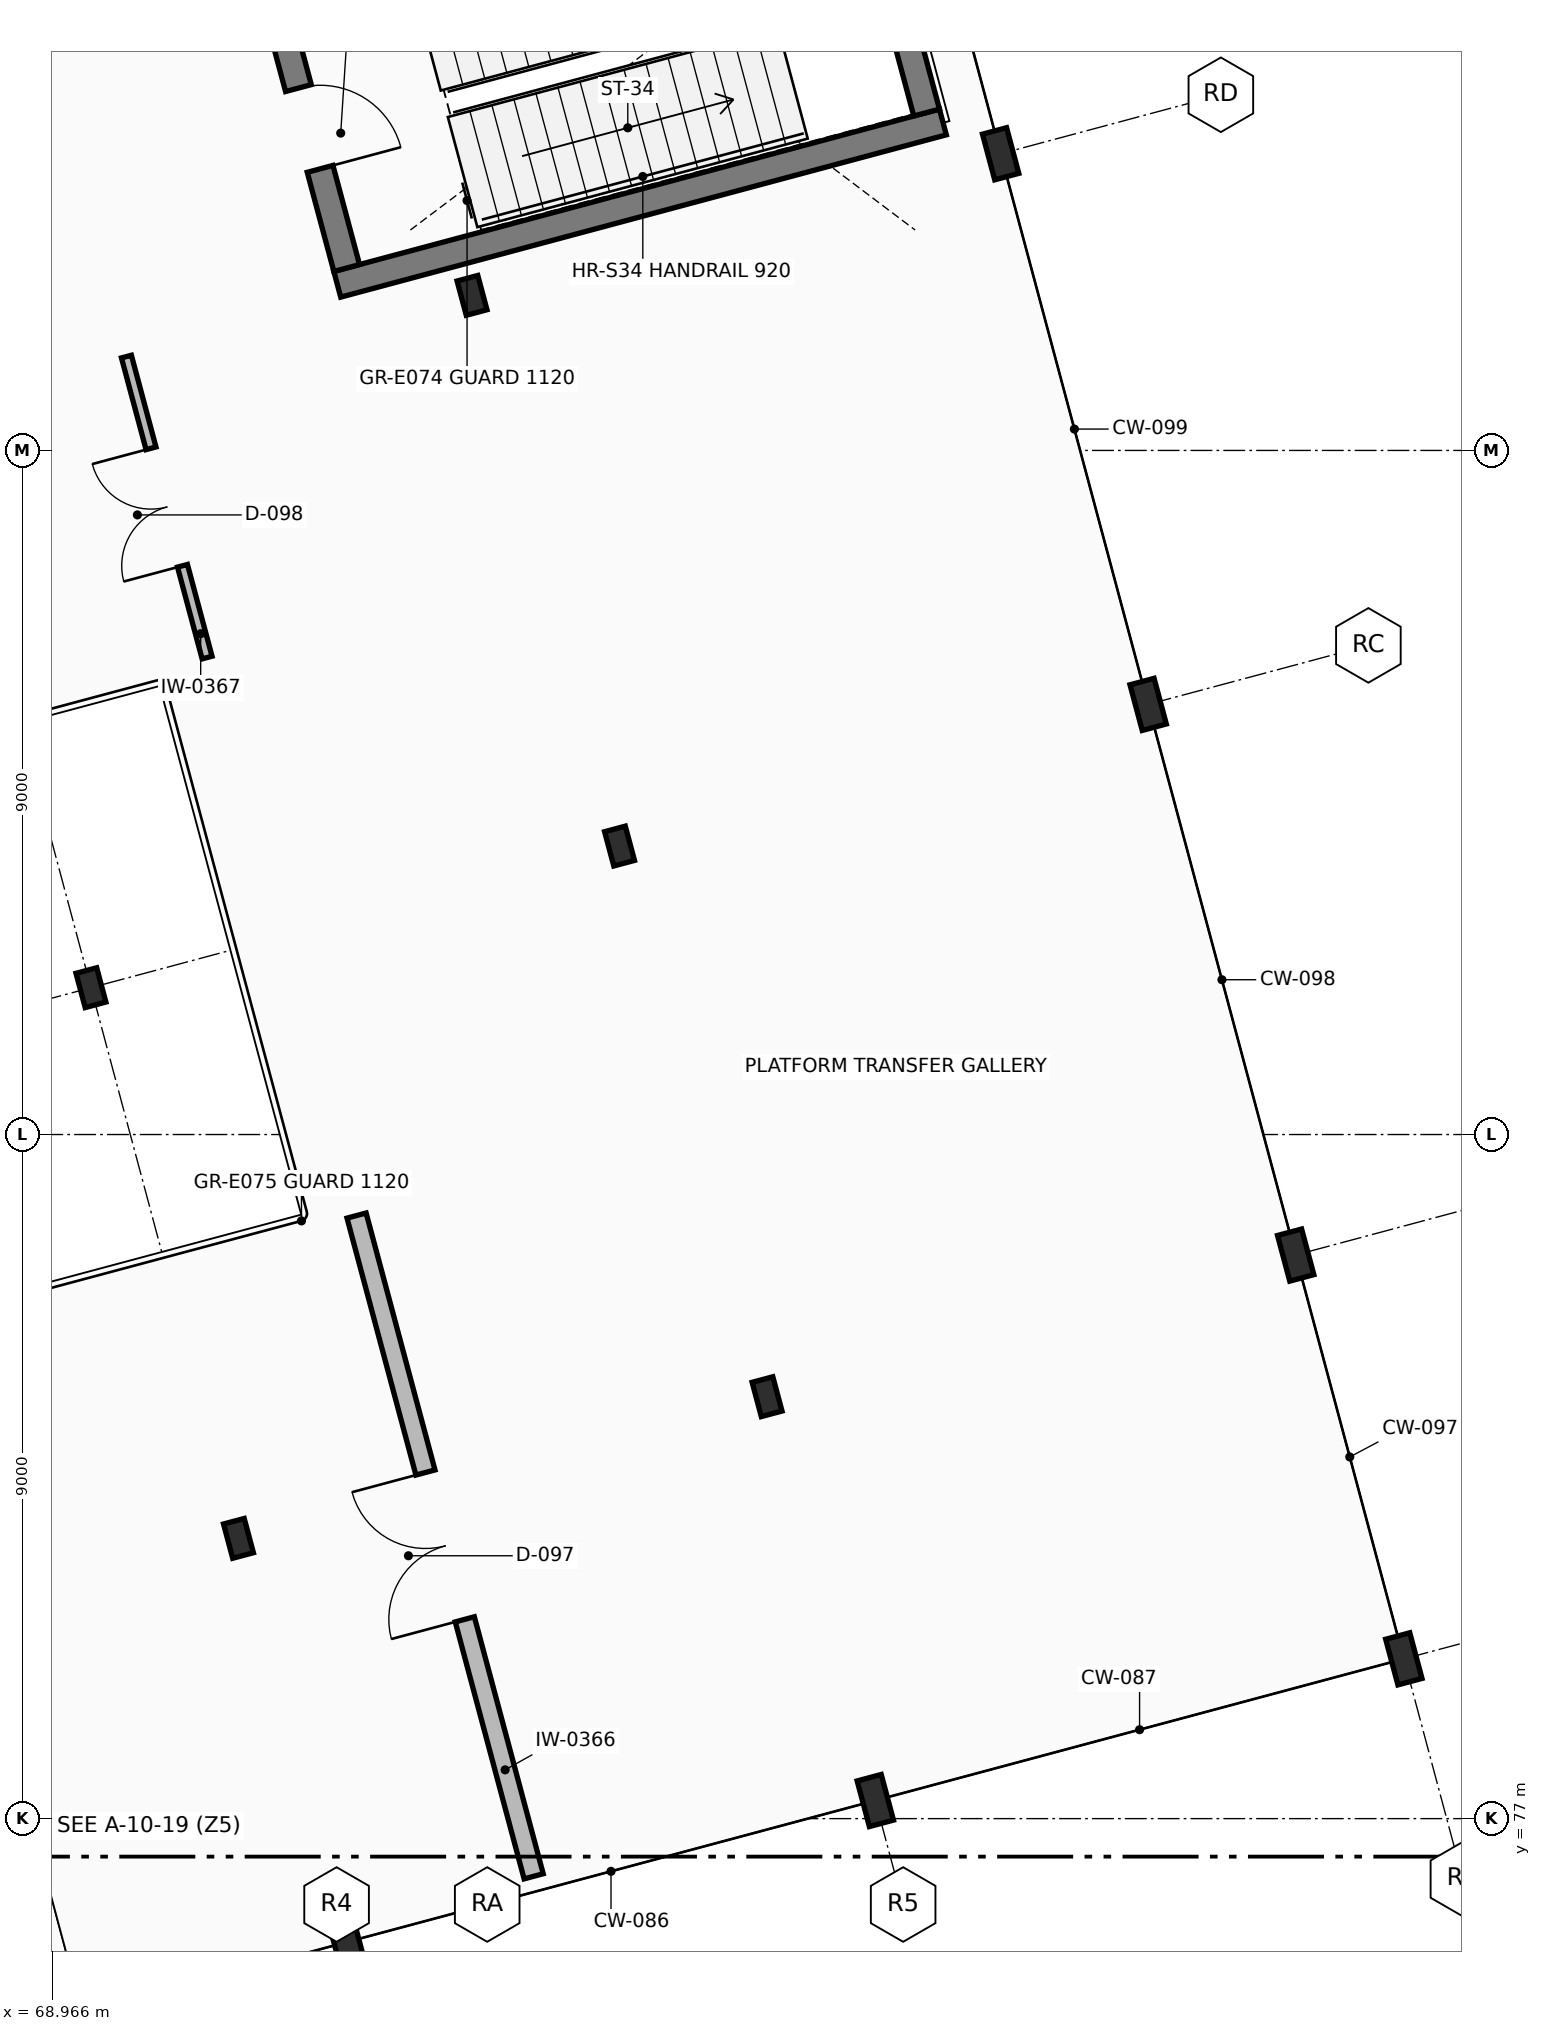
"""IFC4 building model, lengths in metres.
Left out: names, types, materials, properties, quantities, classifications, styles, units other than length and angle.
Written with IfcOpenShell. Run it as: python <this file> out.ifc"""

import sys

from ifc_helpers import new_model, si_unit, direction, frame, frame_2d, origin, origin_2d, place, context, subcontext, project, spatial, rectangle, i_section, extrude, element, fill, save


model = new_model("IFC4")
c1 = context("Model", 3, precision=1e-05, world=origin(), true_north=direction((0.0, 1.0)))
c2 = subcontext(c1, "Body", "Model", "MODEL_VIEW")
j1 = project(units=[si_unit("LENGTHUNIT", "METRE"), si_unit("PLANEANGLEUNIT", "RADIAN")], contexts=[c1])
p1 = place(None, origin())
s1 = spatial("IfcSite", under=j1, at=p1, CompositionType="ELEMENT")
p2 = place(p1, origin())
s2 = spatial("IfcBuilding", under=s1, at=p2, CompositionType="ELEMENT")
p3 = place(p2, frame((0.0, 0.0, 4.8)))
s3 = spatial("IfcBuildingStorey", under=s2, at=p3, CompositionType="ELEMENT", Elevation=4.8)
p4 = place(p3, frame((72.842, 75.375, 0.0), z_axis=(0.0, 0.0, 1.0), x_axis=(0.965925826289, 0.258819045103, 0.0)))
e1 = element("IfcColumn", 1, at=p4, inside=s3, PredefinedType="COLUMN", context=c2, shape_type="SweptSolid", body=[
    extrude(i_section(OverallWidth=0.328, OverallDepth=0.622, WebThickness=0.015, FlangeThickness=0.024, at=origin_2d()), origin(), (0.0, 0.0, 1.0), 4.8),
])
for number, where, z_axis, x_axis in (
    (2, (71.418, 80.687, 0.0), (0.0, 0.0, 1.0), (0.966, 0.259, 0.0)),
    (3, (69.477, 87.932, 0.0), (0.0, 0.0, 1.0), (0.966, 0.259, 0.0)),
):
    element("IfcColumn", number, at=place(p3, frame(where, z_axis=z_axis, x_axis=x_axis)), inside=s3, PredefinedType="COLUMN", context=c2, shape_type="SweptSolid", body=[
        extrude(i_section(OverallWidth=0.282, OverallDepth=0.467, WebThickness=0.012, FlangeThickness=0.02, at=origin_2d()), origin(), (0.0, 0.0, 1.0), 4.8),
    ])
p5 = place(p3, frame((79.797, 77.238, 0.0), z_axis=(0.0, 0.0, 1.0), x_axis=(0.965925826289, 0.258819045103, 0.0)))
e4 = element("IfcColumn", 4, at=p5, inside=s3, PredefinedType="COLUMN", context=c2, shape_type="SweptSolid", body=[
    extrude(i_section(OverallWidth=0.328, OverallDepth=0.622, WebThickness=0.015, FlangeThickness=0.024, at=origin_2d()), origin(), (0.0, 0.0, 1.0), 4.8),
])
for number, where, z_axis, x_axis in (
    (5, (78.373, 82.551, 0.0), (0.0, 0.0, 1.0), (0.966, 0.259, 0.0)),
    (6, (76.432, 89.795, 0.0), (0.0, 0.0, 1.0), (0.966, 0.259, 0.0)),
    (7, (74.491, 97.04, 0.0), (0.0, 0.0, 1.0), (0.966, 0.259, 0.0)),
):
    element("IfcColumn", number, at=place(p3, frame(where, z_axis=z_axis, x_axis=x_axis)), inside=s3, PredefinedType="COLUMN", context=c2, shape_type="SweptSolid", body=[
        extrude(i_section(OverallWidth=0.282, OverallDepth=0.467, WebThickness=0.012, FlangeThickness=0.02, at=origin_2d()), origin(), (0.0, 0.0, 1.0), 4.8),
    ])
for number, where, z_axis, x_axis in (
    (8, (86.751, 79.102, 0.0), (0.0, 0.0, 1.0), (0.966, 0.259, 0.0)),
    (9, (85.328, 84.414, 0.0), (0.0, 0.0, 1.0), (0.966, 0.259, 0.0)),
    (10, (83.387, 91.659, 0.0), (0.0, 0.0, 1.0), (0.966, 0.259, 0.0)),
    (11, (81.446, 98.903, 0.0), (0.0, 0.0, 1.0), (0.966, 0.259, 0.0)),
):
    element("IfcColumn", number, at=place(p3, frame(where, z_axis=z_axis, x_axis=x_axis)), inside=s3, PredefinedType="COLUMN", context=c2, shape_type="SweptSolid", body=[
        extrude(i_section(OverallWidth=0.328, OverallDepth=0.622, WebThickness=0.015, FlangeThickness=0.024, at=origin_2d()), origin(), (0.0, 0.0, 1.0), 4.8),
    ])
p6 = place(p3, frame((72.718, 97.186, 0.0), z_axis=(0.0, 0.0, 1.0), x_axis=(0.965926253902, 0.258817449225, 0.0)))
e12 = element("IfcWall", 12, at=p6, inside=s3, PredefinedType="SHEAR", context=c2, shape_type="SweptSolid", body=[
    extrude(rectangle(XDim=8.249, YDim=0.35, at=frame_2d((4.125, 0.0))), origin(), (0.0, 0.0, 1.0), 4.49),
])
p7 = place(p3, frame((80.472, 99.445, 0.0), z_axis=(0.0, 0.0, 1.0), x_axis=(-0.258903281768, 0.965903251206, 0.0)))
e13 = element("IfcWall", 13, at=p7, inside=s3, PredefinedType="SHEAR", context=c2, shape_type="SweptSolid", body=[
    extrude(rectangle(XDim=3.649, YDim=0.35, at=frame_2d((1.825, 0.0))), origin(), (0.0, 0.0, 1.0), 4.49),
])
p8 = place(p3, frame((71.896, 100.926, 0.0), z_axis=(0.0, 0.0, 1.0), x_axis=(0.259131609127, -0.965842020804, 0.0)))
e14 = element("IfcWall", 14, at=p8, inside=s3, PredefinedType="SHEAR", context=c2, shape_type="SweptSolid", body=[
    extrude(rectangle(XDim=3.651, YDim=0.35, at=frame_2d((1.825, 0.0))), origin(), (0.0, 0.0, 1.0), 4.49),
])
p9 = place(p8, frame((1.2, 0.0, 0.0)))
e15 = element("IfcOpeningElement", 15, at=p9, cuts=e14, PredefinedType="OPENING", context=c2, shape_type="SweptSolid", body=[
    extrude(rectangle(XDim=1.1, YDim=2.2, at=frame_2d((0.55, 1.1))), frame((0.0, 0.185, 0.0), z_axis=(0.0, -1.0, 0.0), x_axis=(1.0, 0.0, 0.0)), (0.0, 0.0, 1.0), 0.37),
])
p10 = place(p3, frame((75.302, 76.241, 0.0), z_axis=(0.0, 0.0, 1.0), x_axis=(-0.258898342071, 0.965904575242, 0.0)))
e16 = element("IfcWall", 16, at=p10, inside=s3, PredefinedType="PARTITIONING", context=c2, shape_type="SweptSolid", body=[
    extrude(rectangle(XDim=9.0, YDim=0.26, at=frame_2d((4.5, 0.0))), origin(), (0.0, 0.0, 1.0), 3.772),
])
p11 = place(p10, frame((3.5, 0.0, 0.0)))
e17 = element("IfcOpeningElement", 17, at=p11, cuts=e16, PredefinedType="OPENING", context=c2, shape_type="SweptSolid", body=[
    extrude(rectangle(XDim=2.0, YDim=2.4, at=frame_2d((1.0, 1.2))), frame((0.0, 0.14, 0.0), z_axis=(0.0, -1.0, 0.0), x_axis=(1.0, 0.0, 0.0)), (0.0, 0.0, 1.0), 0.28),
])
p12 = place(p3, frame((71.005, 92.275, 0.0), z_axis=(0.0, 0.0, 1.0), x_axis=(-0.258741046173, 0.965946722664, 0.0)))
e18 = element("IfcWall", 18, at=p12, inside=s3, PredefinedType="PARTITIONING", context=c2, shape_type="SweptSolid", body=[
    extrude(rectangle(XDim=4.1, YDim=0.135, at=frame_2d((2.05, 0.0))), origin(), (0.0, 0.0, 1.0), 3.772),
])
p13 = place(p12, frame((1.25, 0.0, 0.0)))
e19 = element("IfcOpeningElement", 19, at=p13, cuts=e18, PredefinedType="OPENING", context=c2, shape_type="SweptSolid", body=[
    extrude(rectangle(XDim=1.6, YDim=2.25, at=frame_2d((0.8, 1.125))), frame((0.0, 0.077, 0.0), z_axis=(0.0, -1.0, 0.0), x_axis=(1.0, 0.0, 0.0)), (0.0, 0.0, 1.0), 0.155),
])
p14 = place(p9, origin())
e20 = element("IfcDoor", 20, at=p14, inside=s3, OperationType="SINGLE_SWING_RIGHT", PredefinedType="DOOR", context=c2, shape_type="SweptSolid", body=[
    extrude(rectangle(XDim=1.1, YDim=2.2, at=frame_2d((0.55, 1.1))), frame((0.0, 0.025, 0.0), z_axis=(0.0, -1.0, 0.0), x_axis=(1.0, 0.0, 0.0)), (0.0, 0.0, 1.0), 0.05),
])
fill(e15, e20)
p15 = place(p11, origin())
e21 = element("IfcDoor", 21, at=p15, inside=s3, OperationType="DOUBLE_DOOR_SINGLE_SWING", PredefinedType="DOOR", context=c2, shape_type="SweptSolid", body=[
    extrude(rectangle(XDim=2.0, YDim=2.4, at=frame_2d((1.0, 1.2))), frame((0.0, 0.025, 0.0), z_axis=(0.0, -1.0, 0.0), x_axis=(1.0, 0.0, 0.0)), (0.0, 0.0, 1.0), 0.05),
])
fill(e17, e21)
p16 = place(p13, origin())
e22 = element("IfcDoor", 22, at=p16, inside=s3, OperationType="DOUBLE_SWING_LEFT", PredefinedType="DOOR", context=c2, shape_type="SweptSolid", body=[
    extrude(rectangle(XDim=1.6, YDim=2.25, at=frame_2d((0.8, 1.125))), frame((0.0, 0.025, 0.0), z_axis=(0.0, -1.0, 0.0), x_axis=(1.0, 0.0, 0.0)), (0.0, 0.0, 1.0), 0.05),
])
fill(e19, e22)
save(model, sys.argv[1])
